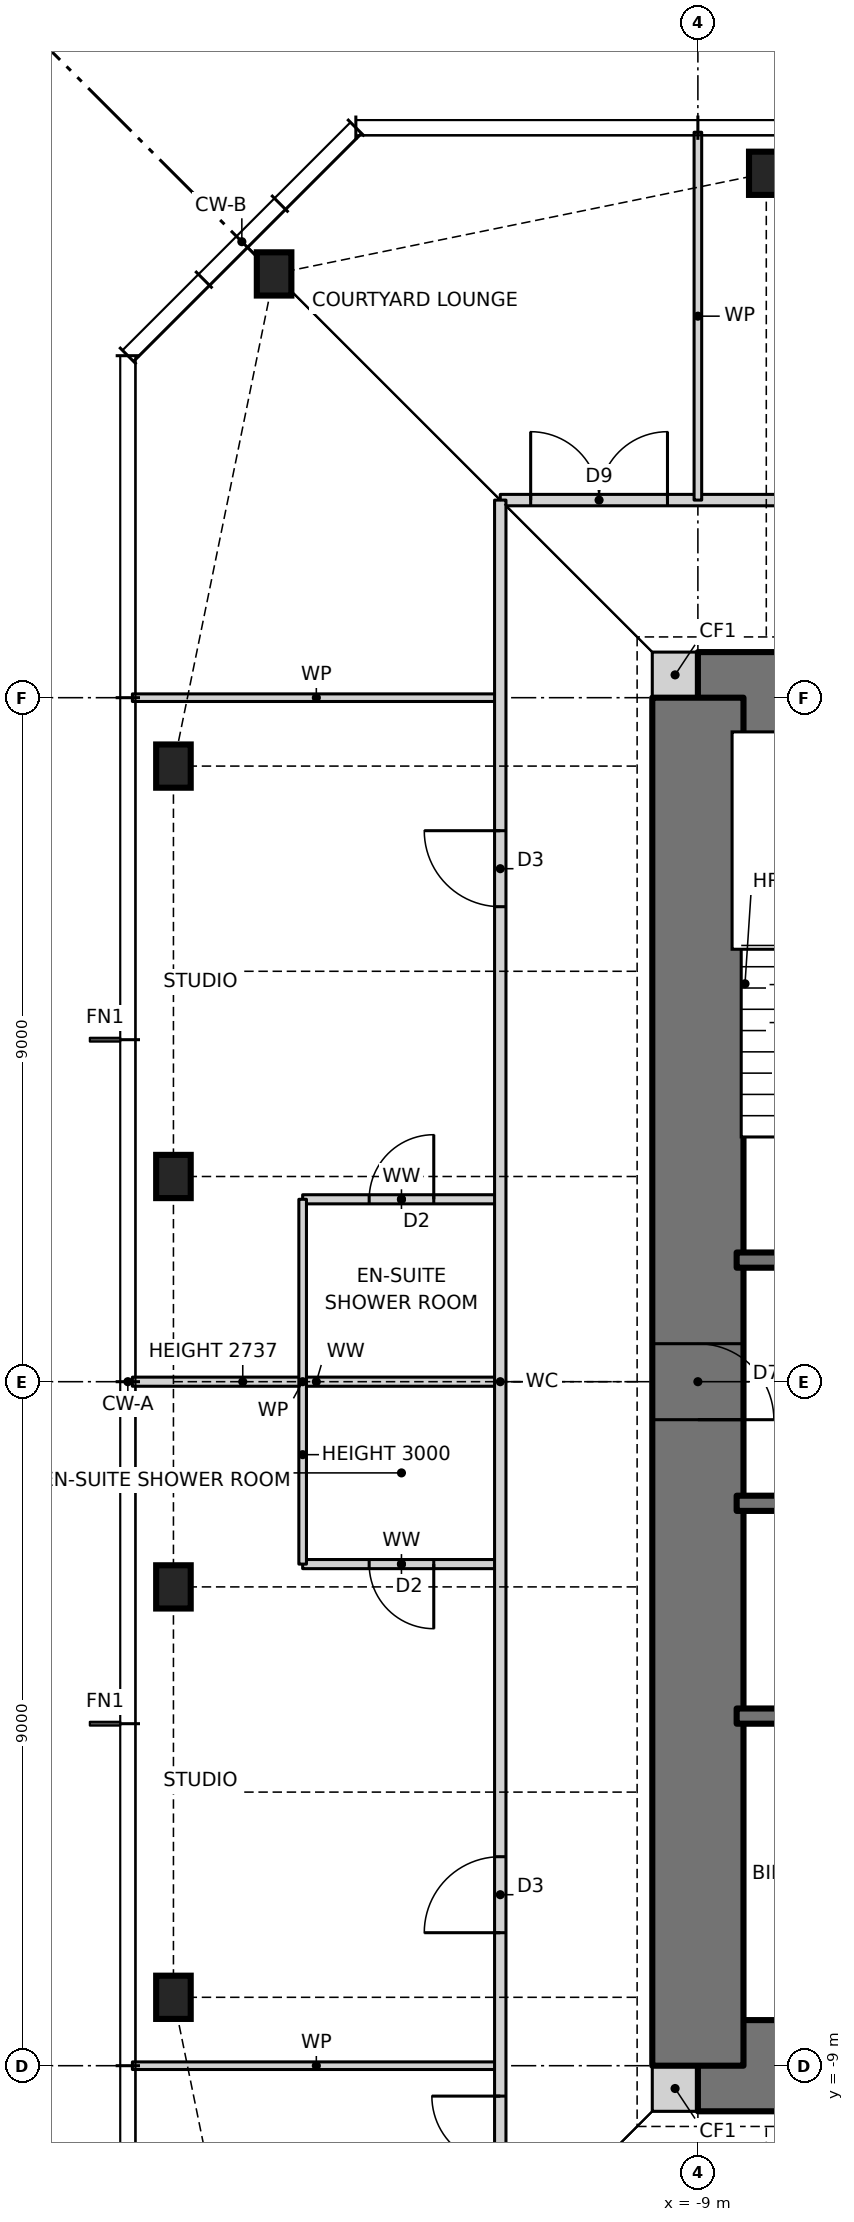
"""IFC4 building model, lengths in metres.
Left out: names, types, materials, properties, quantities, classifications, styles, units other than length and angle.
Written with IfcOpenShell. Run it as: python <this file> out.ifc"""

import sys

from ifc_helpers import new_model, si_unit, direction, frame, frame_2d, origin, origin_2d, place, context, subcontext, project, spatial, rectangle, i_section, extrude, element, fill, save


model = new_model("IFC4")
c1 = context("Model", 3, precision=1e-05, world=origin(), true_north=direction((0.0, 1.0)))
c2 = subcontext(c1, "Body", "Model", "MODEL_VIEW")
j1 = project(units=[si_unit("LENGTHUNIT", "METRE"), si_unit("PLANEANGLEUNIT", "RADIAN")], contexts=[c1])
p1 = place(None, origin())
s1 = spatial("IfcSite", under=j1, at=p1, CompositionType="ELEMENT")
p2 = place(p1, origin())
s2 = spatial("IfcBuilding", under=s1, at=p2, CompositionType="ELEMENT")
p3 = place(p2, frame((0.0, 0.0, 253.5)))
s3 = spatial("IfcBuildingStorey", under=s2, at=p3, CompositionType="ELEMENT", Elevation=253.5)
for number, where, z_axis, x_axis in (
    (1, (-8.1, 15.9, 0.0), (0.0, 0.0, 1.0), (1.0, 0.0, 0.0)),
    (2, (-14.576, 14.576, 0.0), (0.0, 0.0, 1.0), (1.0, 0.0, 0.0)),
    (3, (-15.9, 8.1, 0.0), (0.0, 0.0, 1.0), (1.0, 0.0, 0.0)),
    (4, (-15.9, 2.7, 0.0), (0.0, 0.0, 1.0), (1.0, 0.0, 0.0)),
    (5, (-15.9, -2.7, 0.0), (0.0, 0.0, 1.0), (1.0, 0.0, 0.0)),
    (6, (-15.9, -8.1, 0.0), (0.0, 0.0, 1.0), (1.0, 0.0, 0.0)),
):
    element("IfcColumn", number, at=place(p3, frame(where, z_axis=z_axis, x_axis=x_axis)), inside=s3, PredefinedType="COLUMN", context=c2, shape_type="SweptSolid", body=[
        extrude(i_section(OverallWidth=0.455, OverallDepth=0.569, WebThickness=0.078, FlangeThickness=0.125, at=origin_2d()), origin(), (0.0, 0.0, 1.0), 3.5),
    ])
for number, where, z_axis, x_axis in (
    (7, (-9.6, -9.3, 0.0), (0.0, 0.0, 1.0), (1.0, 0.0, 0.0)),
    (8, (-9.6, 9.3, 0.0), (0.0, 0.0, 1.0), (1.0, 0.0, 0.0)),
):
    element("IfcWall", number, at=place(p3, frame(where, z_axis=z_axis, x_axis=x_axis)), inside=s3, PredefinedType="SOLIDWALL", context=c2, shape_type="SweptSolid", body=[
        extrude(rectangle(XDim=0.6, YDim=0.6, at=frame_2d((0.3, 0.0))), origin(), (0.0, 0.0, 1.0), 3.5),
    ])
p4 = place(p3, frame((-9.0, -9.0, 0.0), z_axis=(0.0, 0.0, 1.0), x_axis=(1.0, 0.0, 0.0)))
e9 = element("IfcWall", 9, at=p4, inside=s3, PredefinedType="SHEAR", context=c2, shape_type="SweptSolid", body=[
    extrude(rectangle(XDim=18.0, YDim=1.2, at=frame_2d((9.0, 0.0))), origin(), (0.0, 0.0, 1.0), 3.5),
])
p5 = place(p4, frame((3.775, 0.0, 0.0)))
e10 = element("IfcOpeningElement", 10, at=p5, cuts=e9, PredefinedType="OPENING", context=c2, shape_type="SweptSolid", body=[
    extrude(rectangle(XDim=0.9, YDim=2.1, at=frame_2d((0.45, 1.05))), frame((0.0, 0.61, 0.0), z_axis=(0.0, -1.0, 0.0), x_axis=(1.0, 0.0, 0.0)), (0.0, 0.0, 1.0), 1.22),
])
p6 = place(p4, frame((10.625, 0.0, 0.0)))
e11 = element("IfcOpeningElement", 11, at=p6, cuts=e9, PredefinedType="OPENING", context=c2, shape_type="SweptSolid", body=[
    extrude(rectangle(XDim=0.9, YDim=2.1, at=frame_2d((0.45, 1.05))), frame((0.0, 0.61, 0.0), z_axis=(0.0, -1.0, 0.0), x_axis=(1.0, 0.0, 0.0)), (0.0, 0.0, 1.0), 1.22),
])
p7 = place(p3, frame((9.0, 9.0, 0.0), z_axis=(0.0, 0.0, 1.0), x_axis=(-1.0, 0.0, 0.0)))
e12 = element("IfcWall", 12, at=p7, inside=s3, PredefinedType="SHEAR", context=c2, shape_type="SweptSolid", body=[
    extrude(rectangle(XDim=18.0, YDim=1.2, at=frame_2d((9.0, 0.0))), origin(), (0.0, 0.0, 1.0), 3.5),
])
p8 = place(p7, frame((11.125, 0.0, 0.0)))
e13 = element("IfcOpeningElement", 13, at=p8, cuts=e12, PredefinedType="OPENING", context=c2, shape_type="SweptSolid", body=[
    extrude(rectangle(XDim=0.9, YDim=2.1, at=frame_2d((0.45, 1.05))), frame((0.0, 0.61, 0.0), z_axis=(0.0, -1.0, 0.0), x_axis=(1.0, 0.0, 0.0)), (0.0, 0.0, 1.0), 1.22),
])
p9 = place(p7, frame((4.275, 0.0, 0.0)))
e14 = element("IfcOpeningElement", 14, at=p9, cuts=e12, PredefinedType="OPENING", context=c2, shape_type="SweptSolid", body=[
    extrude(rectangle(XDim=0.9, YDim=2.1, at=frame_2d((0.45, 1.05))), frame((0.0, 0.61, 0.0), z_axis=(0.0, -1.0, 0.0), x_axis=(1.0, 0.0, 0.0)), (0.0, 0.0, 1.0), 1.22),
])
p10 = place(p3, frame((-9.0, 9.0, 0.0), z_axis=(0.0, 0.0, 1.0), x_axis=(0.0, -1.0, 0.0)))
e15 = element("IfcWall", 15, at=p10, inside=s3, PredefinedType="SHEAR", context=c2, shape_type="SweptSolid", body=[
    extrude(rectangle(XDim=18.0, YDim=1.2, at=frame_2d((9.0, 0.0))), origin(), (0.0, 0.0, 1.0), 3.5),
])
p11 = place(p10, frame((8.5, 0.0, 0.0)))
e16 = element("IfcOpeningElement", 16, at=p11, cuts=e15, PredefinedType="OPENING", context=c2, shape_type="SweptSolid", body=[
    extrude(rectangle(XDim=1.0, YDim=2.1, at=frame_2d((0.5, 1.05))), frame((0.0, 0.61, 0.0), z_axis=(0.0, -1.0, 0.0), x_axis=(1.0, 0.0, 0.0)), (0.0, 0.0, 1.0), 1.22),
])
p12 = place(p3, frame((-16.44, -9.0, 0.0), z_axis=(0.0, 0.0, 1.0), x_axis=(1.0, 0.0, 0.0)))
e17 = element("IfcWall", 17, at=p12, inside=s3, PredefinedType="PARTITIONING", context=c2, shape_type="SweptSolid", body=[
    extrude(rectangle(XDim=4.84, YDim=0.1, at=frame_2d((2.42, 0.0))), origin(), (0.0, 0.0, 1.0), 3.27),
])
p13 = place(p3, frame((-8.49, -4.4, 0.0), z_axis=(0.0, 0.0, 1.0), x_axis=(1.0, 0.0, 0.0)))
e18 = element("IfcWall", 18, at=p13, inside=s3, PredefinedType="SOLIDWALL", context=c2, shape_type="SweptSolid", body=[
    extrude(rectangle(XDim=13.64, YDim=0.2, at=frame_2d((6.82, 0.0))), origin(), (0.0, 0.0, 1.0), 3.5),
])
p14 = place(p3, frame((-14.2, -2.4, 0.0), z_axis=(0.0, 0.0, 1.0), x_axis=(1.0, 0.0, 0.0)))
e19 = element("IfcWall", 19, at=p14, inside=s3, PredefinedType="PARTITIONING", context=c2, shape_type="SweptSolid", body=[
    extrude(rectangle(XDim=2.6, YDim=0.12, at=frame_2d((1.3, 0.0))), origin(), (0.0, 0.0, 1.0), 3.27),
])
p15 = place(p14, frame((0.875, 0.0, 0.0)))
e20 = element("IfcOpeningElement", 20, at=p15, cuts=e19, PredefinedType="OPENING", context=c2, shape_type="SweptSolid", body=[
    extrude(rectangle(XDim=0.85, YDim=2.1, at=frame_2d((0.425, 1.05))), frame((0.0, 0.07, 0.0), z_axis=(0.0, -1.0, 0.0), x_axis=(1.0, 0.0, 0.0)), (0.0, 0.0, 1.0), 0.14),
])
p16 = place(p3, frame((-8.49, -1.6, 0.0), z_axis=(0.0, 0.0, 1.0), x_axis=(1.0, 0.0, 0.0)))
e21 = element("IfcWall", 21, at=p16, inside=s3, PredefinedType="SOLIDWALL", context=c2, shape_type="SweptSolid", body=[
    extrude(rectangle(XDim=16.98, YDim=0.2, at=frame_2d((8.49, 0.0))), origin(), (0.0, 0.0, 1.0), 3.5),
])
p17 = place(p16, frame((14.81, 0.0, 0.0)))
e22 = element("IfcOpeningElement", 22, at=p17, cuts=e21, PredefinedType="OPENING", context=c2, shape_type="SweptSolid", body=[
    extrude(rectangle(XDim=1.0, YDim=2.1, at=frame_2d((0.5, 1.05))), frame((0.0, 0.11, 0.0), z_axis=(0.0, -1.0, 0.0), x_axis=(1.0, 0.0, 0.0)), (0.0, 0.0, 1.0), 0.22),
])
p18 = place(p16, frame((1.232, 0.0, 0.0)))
e23 = element("IfcOpeningElement", 23, at=p18, cuts=e21, PredefinedType="OPENING", context=c2, shape_type="SweptSolid", body=[
    extrude(rectangle(XDim=0.9, YDim=2.1, at=frame_2d((0.45, 1.05))), frame((0.0, 0.11, 0.0), z_axis=(0.0, -1.0, 0.0), x_axis=(1.0, 0.0, 0.0)), (0.0, 0.0, 1.0), 0.22),
])
p19 = place(p16, frame((4.627, 0.0, 0.0)))
e24 = element("IfcOpeningElement", 24, at=p19, cuts=e21, PredefinedType="OPENING", context=c2, shape_type="SweptSolid", body=[
    extrude(rectangle(XDim=0.9, YDim=2.1, at=frame_2d((0.45, 1.05))), frame((0.0, 0.11, 0.0), z_axis=(0.0, -1.0, 0.0), x_axis=(1.0, 0.0, 0.0)), (0.0, 0.0, 1.0), 0.22),
])
p20 = place(p16, frame((8.052, 0.0, 0.0)))
e25 = element("IfcOpeningElement", 25, at=p20, cuts=e21, PredefinedType="OPENING", context=c2, shape_type="SweptSolid", body=[
    extrude(rectangle(XDim=0.9, YDim=2.1, at=frame_2d((0.45, 1.05))), frame((0.0, 0.11, 0.0), z_axis=(0.0, -1.0, 0.0), x_axis=(1.0, 0.0, 0.0)), (0.0, 0.0, 1.0), 0.22),
])
p21 = place(p16, frame((11.478, 0.0, 0.0)))
e26 = element("IfcOpeningElement", 26, at=p21, cuts=e21, PredefinedType="OPENING", context=c2, shape_type="SweptSolid", body=[
    extrude(rectangle(XDim=0.9, YDim=2.1, at=frame_2d((0.45, 1.05))), frame((0.0, 0.11, 0.0), z_axis=(0.0, -1.0, 0.0), x_axis=(1.0, 0.0, 0.0)), (0.0, 0.0, 1.0), 0.22),
])
p22 = place(p3, frame((-16.44, 0.0, 0.0), z_axis=(0.0, 0.0, 1.0), x_axis=(1.0, 0.0, 0.0)))
e27 = element("IfcWall", 27, at=p22, inside=s3, PredefinedType="PARTITIONING", context=c2, shape_type="SweptSolid", body=[
    extrude(rectangle(XDim=4.84, YDim=0.12, at=frame_2d((2.42, 0.0))), origin(), (0.0, 0.0, 1.0), 2.737),
])
p23 = place(p3, frame((-8.49, 1.6, 0.0), z_axis=(0.0, 0.0, 1.0), x_axis=(1.0, 0.0, 0.0)))
e28 = element("IfcWall", 28, at=p23, inside=s3, PredefinedType="SOLIDWALL", context=c2, shape_type="SweptSolid", body=[
    extrude(rectangle(XDim=16.98, YDim=0.2, at=frame_2d((8.49, 0.0))), origin(), (0.0, 0.0, 1.0), 3.5),
])
p24 = place(p23, frame((1.17, 0.0, 0.0)))
e29 = element("IfcOpeningElement", 29, at=p24, cuts=e28, PredefinedType="OPENING", context=c2, shape_type="SweptSolid", body=[
    extrude(rectangle(XDim=1.0, YDim=2.1, at=frame_2d((0.5, 1.05))), frame((0.0, 0.11, 0.0), z_axis=(0.0, -1.0, 0.0), x_axis=(1.0, 0.0, 0.0)), (0.0, 0.0, 1.0), 0.22),
])
p25 = place(p23, frame((4.606, 0.0, 0.0)))
e30 = element("IfcOpeningElement", 30, at=p25, cuts=e28, PredefinedType="OPENING", context=c2, shape_type="SweptSolid", body=[
    extrude(rectangle(XDim=0.9, YDim=2.1, at=frame_2d((0.45, 1.05))), frame((0.0, 0.11, 0.0), z_axis=(0.0, -1.0, 0.0), x_axis=(1.0, 0.0, 0.0)), (0.0, 0.0, 1.0), 0.22),
])
p26 = place(p23, frame((8.04, 0.0, 0.0)))
e31 = element("IfcOpeningElement", 31, at=p26, cuts=e28, PredefinedType="OPENING", context=c2, shape_type="SweptSolid", body=[
    extrude(rectangle(XDim=0.9, YDim=2.1, at=frame_2d((0.45, 1.05))), frame((0.0, 0.11, 0.0), z_axis=(0.0, -1.0, 0.0), x_axis=(1.0, 0.0, 0.0)), (0.0, 0.0, 1.0), 0.22),
])
p27 = place(p23, frame((11.374, 0.0, 0.0)))
e32 = element("IfcOpeningElement", 32, at=p27, cuts=e28, PredefinedType="OPENING", context=c2, shape_type="SweptSolid", body=[
    extrude(rectangle(XDim=1.1, YDim=2.1, at=frame_2d((0.55, 1.05))), frame((0.0, 0.11, 0.0), z_axis=(0.0, -1.0, 0.0), x_axis=(1.0, 0.0, 0.0)), (0.0, 0.0, 1.0), 0.22),
])
p28 = place(p23, frame((14.66, 0.0, 0.0)))
e33 = element("IfcOpeningElement", 33, at=p28, cuts=e28, PredefinedType="OPENING", context=c2, shape_type="SweptSolid", body=[
    extrude(rectangle(XDim=1.3, YDim=2.1, at=frame_2d((0.65, 1.05))), frame((0.0, 0.11, 0.0), z_axis=(0.0, -1.0, 0.0), x_axis=(1.0, 0.0, 0.0)), (0.0, 0.0, 1.0), 0.22),
])
p29 = place(p3, frame((-14.2, 2.4, 0.0), z_axis=(0.0, 0.0, 1.0), x_axis=(1.0, 0.0, 0.0)))
e34 = element("IfcWall", 34, at=p29, inside=s3, PredefinedType="PARTITIONING", context=c2, shape_type="SweptSolid", body=[
    extrude(rectangle(XDim=2.6, YDim=0.12, at=frame_2d((1.3, 0.0))), origin(), (0.0, 0.0, 1.0), 3.27),
])
p30 = place(p29, frame((0.875, 0.0, 0.0)))
e35 = element("IfcOpeningElement", 35, at=p30, cuts=e34, PredefinedType="OPENING", context=c2, shape_type="SweptSolid", body=[
    extrude(rectangle(XDim=0.85, YDim=2.1, at=frame_2d((0.425, 1.05))), frame((0.0, 0.07, 0.0), z_axis=(0.0, -1.0, 0.0), x_axis=(1.0, 0.0, 0.0)), (0.0, 0.0, 1.0), 0.14),
])
p31 = place(p3, frame((-16.44, 9.0, 0.0), z_axis=(0.0, 0.0, 1.0), x_axis=(1.0, 0.0, 0.0)))
e36 = element("IfcWall", 36, at=p31, inside=s3, PredefinedType="PARTITIONING", context=c2, shape_type="SweptSolid", body=[
    extrude(rectangle(XDim=4.84, YDim=0.1, at=frame_2d((2.42, 0.0))), origin(), (0.0, 0.0, 1.0), 3.27),
])
p32 = place(p3, frame((-11.6, 11.6, 0.0), z_axis=(0.0, 0.0, 1.0), x_axis=(1.0, 0.0, 0.0)))
e37 = element("IfcWall", 37, at=p32, inside=s3, PredefinedType="PARTITIONING", context=c2, shape_type="SweptSolid", body=[
    extrude(rectangle(XDim=23.7, YDim=0.15, at=frame_2d((11.85, 0.0))), origin(), (0.0, 0.0, 1.0), 3.27),
])
p33 = place(p32, frame((17.85, 0.0, 0.0)))
e38 = element("IfcOpeningElement", 38, at=p33, cuts=e37, PredefinedType="OPENING", context=c2, shape_type="SweptSolid", body=[
    extrude(rectangle(XDim=1.0, YDim=2.1, at=frame_2d((0.5, 1.05))), frame((0.0, 0.085, 0.0), z_axis=(0.0, -1.0, 0.0), x_axis=(1.0, 0.0, 0.0)), (0.0, 0.0, 1.0), 0.17),
])
p34 = place(p32, frame((4.35, 0.0, 0.0)))
e39 = element("IfcOpeningElement", 39, at=p34, cuts=e37, PredefinedType="OPENING", context=c2, shape_type="SweptSolid", body=[
    extrude(rectangle(XDim=1.0, YDim=2.1, at=frame_2d((0.5, 1.05))), frame((0.0, 0.085, 0.0), z_axis=(0.0, -1.0, 0.0), x_axis=(1.0, 0.0, 0.0)), (0.0, 0.0, 1.0), 0.17),
])
p35 = place(p32, frame((0.4, 0.0, 0.0)))
e40 = element("IfcOpeningElement", 40, at=p35, cuts=e37, PredefinedType="OPENING", context=c2, shape_type="SweptSolid", body=[
    extrude(rectangle(XDim=1.8, YDim=2.1, at=frame_2d((0.9, 1.05))), frame((0.0, 0.085, 0.0), z_axis=(0.0, -1.0, 0.0), x_axis=(1.0, 0.0, 0.0)), (0.0, 0.0, 1.0), 0.17),
])
p36 = place(p32, frame((21.25, 0.0, 0.0)))
e41 = element("IfcOpeningElement", 41, at=p36, cuts=e37, PredefinedType="OPENING", context=c2, shape_type="SweptSolid", body=[
    extrude(rectangle(XDim=1.8, YDim=2.1, at=frame_2d((0.9, 1.05))), frame((0.0, 0.085, 0.0), z_axis=(0.0, -1.0, 0.0), x_axis=(1.0, 0.0, 0.0)), (0.0, 0.0, 1.0), 0.17),
])
p37 = place(p3, frame((-9.0, 11.6, 0.0), z_axis=(0.0, 0.0, 1.0), x_axis=(0.0, 1.0, 0.0)))
e42 = element("IfcWall", 42, at=p37, inside=s3, PredefinedType="PARTITIONING", context=c2, shape_type="SweptSolid", body=[
    extrude(rectangle(XDim=4.84, YDim=0.1, at=frame_2d((2.42, 0.0))), origin(), (0.0, 0.0, 1.0), 3.27),
])
p38 = place(p3, frame((-11.6, -11.6, 0.0), z_axis=(0.0, 0.0, 1.0), x_axis=(0.0, 1.0, 0.0)))
e43 = element("IfcWall", 43, at=p38, inside=s3, PredefinedType="PARTITIONING", context=c2, shape_type="SweptSolid", body=[
    extrude(rectangle(XDim=23.2, YDim=0.15, at=frame_2d((11.6, 0.0))), origin(), (0.0, 0.0, 1.0), 3.27),
])
p39 = place(p38, frame((17.85, 0.0, 0.0)))
e44 = element("IfcOpeningElement", 44, at=p39, cuts=e43, PredefinedType="OPENING", context=c2, shape_type="SweptSolid", body=[
    extrude(rectangle(XDim=1.0, YDim=2.1, at=frame_2d((0.5, 1.05))), frame((0.0, 0.085, 0.0), z_axis=(0.0, -1.0, 0.0), x_axis=(1.0, 0.0, 0.0)), (0.0, 0.0, 1.0), 0.17),
])
p40 = place(p38, frame((4.35, 0.0, 0.0)))
e45 = element("IfcOpeningElement", 45, at=p40, cuts=e43, PredefinedType="OPENING", context=c2, shape_type="SweptSolid", body=[
    extrude(rectangle(XDim=1.0, YDim=2.1, at=frame_2d((0.5, 1.05))), frame((0.0, 0.085, 0.0), z_axis=(0.0, -1.0, 0.0), x_axis=(1.0, 0.0, 0.0)), (0.0, 0.0, 1.0), 0.17),
])
p41 = place(p38, frame((0.4, 0.0, 0.0)))
e46 = element("IfcOpeningElement", 46, at=p41, cuts=e43, PredefinedType="OPENING", context=c2, shape_type="SweptSolid", body=[
    extrude(rectangle(XDim=1.8, YDim=2.1, at=frame_2d((0.9, 1.05))), frame((0.0, 0.085, 0.0), z_axis=(0.0, -1.0, 0.0), x_axis=(1.0, 0.0, 0.0)), (0.0, 0.0, 1.0), 0.17),
])
p42 = place(p3, frame((-14.2, -2.4, 0.0), z_axis=(0.0, 0.0, 1.0), x_axis=(0.0, 1.0, 0.0)))
e47 = element("IfcWall", 47, at=p42, inside=s3, PredefinedType="PARTITIONING", context=c2, shape_type="SweptSolid", body=[
    extrude(rectangle(XDim=4.8, YDim=0.1, at=frame_2d((2.4, 0.0))), origin(), (0.0, 0.0, 1.0), 3.0),
])
p43 = place(p39, origin())
e48 = element("IfcDoor", 48, at=p43, inside=s3, OperationType="SINGLE_SWING_RIGHT", PredefinedType="DOOR", context=c2, shape_type="SweptSolid", body=[
    extrude(rectangle(XDim=1.0, YDim=2.1, at=frame_2d((0.5, 1.05))), frame((0.0, 0.025, 0.0), z_axis=(0.0, -1.0, 0.0), x_axis=(1.0, 0.0, 0.0)), (0.0, 0.0, 1.0), 0.05),
])
fill(e44, e48)
p44 = place(p30, origin())
e49 = element("IfcDoor", 49, at=p44, inside=s3, OperationType="SINGLE_SWING_RIGHT", PredefinedType="DOOR", context=c2, shape_type="SweptSolid", body=[
    extrude(rectangle(XDim=0.85, YDim=2.1, at=frame_2d((0.425, 1.05))), frame((0.0, 0.025, 0.0), z_axis=(0.0, -1.0, 0.0), x_axis=(1.0, 0.0, 0.0)), (0.0, 0.0, 1.0), 0.05),
])
fill(e35, e49)
p45 = place(p40, origin())
e50 = element("IfcDoor", 50, at=p45, inside=s3, OperationType="SINGLE_SWING_LEFT", PredefinedType="DOOR", context=c2, shape_type="SweptSolid", body=[
    extrude(rectangle(XDim=1.0, YDim=2.1, at=frame_2d((0.5, 1.05))), frame((0.0, 0.025, 0.0), z_axis=(0.0, -1.0, 0.0), x_axis=(1.0, 0.0, 0.0)), (0.0, 0.0, 1.0), 0.05),
])
fill(e45, e50)
p46 = place(p15, frame((0.85, 0.0, 0.0), z_axis=(0.0, 0.0, 1.0), x_axis=(-1.0, 0.0, 0.0)))
e51 = element("IfcDoor", 51, at=p46, inside=s3, OperationType="SINGLE_SWING_LEFT", PredefinedType="DOOR", context=c2, shape_type="SweptSolid", body=[
    extrude(rectangle(XDim=0.85, YDim=2.1, at=frame_2d((0.425, 1.05))), frame((0.0, 0.025, 0.0), z_axis=(0.0, -1.0, 0.0), x_axis=(1.0, 0.0, 0.0)), (0.0, 0.0, 1.0), 0.05),
])
fill(e20, e51)
p47 = place(p41, origin())
e52 = element("IfcDoor", 52, at=p47, inside=s3, OperationType="DOUBLE_DOOR_SINGLE_SWING", PredefinedType="DOOR", context=c2, shape_type="SweptSolid", body=[
    extrude(rectangle(XDim=1.8, YDim=2.1, at=frame_2d((0.9, 1.05))), frame((0.0, 0.025, 0.0), z_axis=(0.0, -1.0, 0.0), x_axis=(1.0, 0.0, 0.0)), (0.0, 0.0, 1.0), 0.05),
])
fill(e46, e52)
p48 = place(p35, origin())
e53 = element("IfcDoor", 53, at=p48, inside=s3, OperationType="DOUBLE_DOOR_SINGLE_SWING", PredefinedType="DOOR", context=c2, shape_type="SweptSolid", body=[
    extrude(rectangle(XDim=1.8, YDim=2.1, at=frame_2d((0.9, 1.05))), frame((0.0, 0.025, 0.0), z_axis=(0.0, -1.0, 0.0), x_axis=(1.0, 0.0, 0.0)), (0.0, 0.0, 1.0), 0.05),
])
fill(e40, e53)
p49 = place(p11, origin())
e54 = element("IfcDoor", 54, at=p49, inside=s3, OperationType="SINGLE_SWING_RIGHT", PredefinedType="DOOR", context=c2, shape_type="SweptSolid", body=[
    extrude(rectangle(XDim=1.0, YDim=2.1, at=frame_2d((0.5, 1.05))), frame((0.0, 0.025, 0.0), z_axis=(0.0, -1.0, 0.0), x_axis=(1.0, 0.0, 0.0)), (0.0, 0.0, 1.0), 0.05),
])
fill(e16, e54)
save(model, sys.argv[1])
